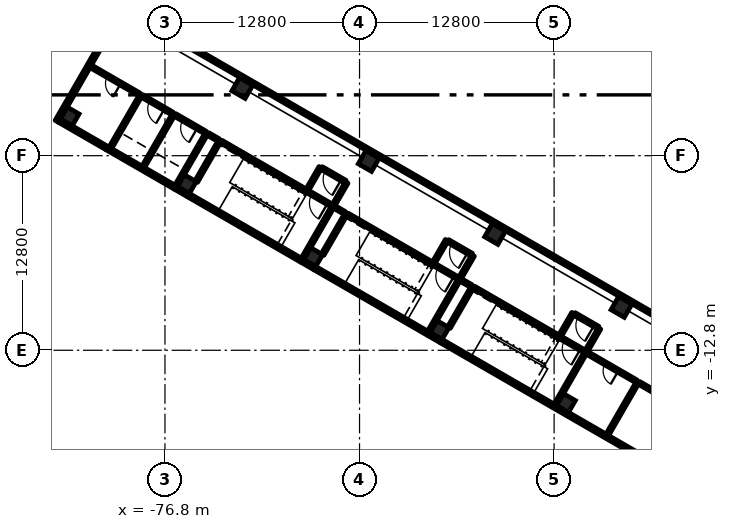
"""IFC4 building model, lengths in metres.
Left out: names, types, materials, properties, quantities, classifications, styles, units other than length and angle.
Written with IfcOpenShell. Run it as: python <this file> out.ifc"""

import sys

from ifc_helpers import new_model, si_unit, direction, frame, frame_2d, origin, origin_2d, place, context, subcontext, project, spatial, rectangle, extrude, element, fill, save


model = new_model("IFC4")
c1 = context("Model", 3, precision=1e-05, world=origin(), true_north=direction((0.0, 1.0)))
c2 = subcontext(c1, "Body", "Model", "MODEL_VIEW")
j1 = project(units=[si_unit("LENGTHUNIT", "METRE"), si_unit("PLANEANGLEUNIT", "RADIAN")], contexts=[c1])
p1 = place(None, origin())
s1 = spatial("IfcSite", under=j1, at=p1, CompositionType="ELEMENT")
p2 = place(p1, origin())
s2 = spatial("IfcBuilding", under=s1, at=p2, CompositionType="ELEMENT")
p3 = place(p2, frame((0.0, 0.0, 16.2)))
s3 = spatial("IfcBuildingStorey", under=s2, at=p3, CompositionType="ELEMENT", Elevation=16.2)
for number, where, z_axis, x_axis in (
    (1, (-46.768, -9.949, 0.0), (0.0, 0.0, 1.0), (-0.5, -0.866, 0.0)),
    (2, (-55.082, -5.149, 0.0), (0.0, 0.0, 1.0), (-0.5, -0.866, 0.0)),
    (3, (-63.396, -0.349, 0.0), (0.0, 0.0, 1.0), (-0.5, -0.866, 0.0)),
    (4, (-71.71, 4.451, 0.0), (0.0, 0.0, 1.0), (-0.5, -0.866, 0.0)),
):
    element("IfcColumn", number, at=place(p3, frame(where, z_axis=z_axis, x_axis=x_axis)), inside=s3, PredefinedType="COLUMN", context=c2, shape_type="SweptSolid", body=[
        extrude(rectangle(XDim=1.0, YDim=1.0, at=origin_2d()), origin(), (0.0, 0.0, 1.0), 5.4),
    ])
for number, where, z_axis, x_axis in (
    (5, (-50.418, -16.271, 0.0), (0.0, 0.0, 1.0), (-0.5, -0.866, 0.0)),
    (6, (-58.732, -11.471, 0.0), (0.0, 0.0, 1.0), (-0.5, -0.866, 0.0)),
    (7, (-67.046, -6.671, 0.0), (0.0, 0.0, 1.0), (-0.5, -0.866, 0.0)),
    (8, (-75.36, -1.871, 0.0), (0.0, 0.0, 1.0), (-0.5, -0.866, 0.0)),
    (9, (-83.067, 2.579, 0.0), (0.0, 0.0, 1.0), (-0.5, -0.866, 0.0)),
):
    element("IfcColumn", number, at=place(p3, frame(where, z_axis=z_axis, x_axis=x_axis)), inside=s3, PredefinedType="COLUMN", context=c2, shape_type="SweptSolid", body=[
        extrude(rectangle(XDim=0.9, YDim=0.9, at=origin_2d()), origin(), (0.0, 0.0, 1.0), 5.4),
    ])
p4 = place(p3, frame((-83.915, 2.26, 0.0), z_axis=(0.0, 0.0, 1.0), x_axis=(0.499999331568, 0.866025789703, 0.0)))
e10 = element("IfcWall", 10, at=p4, inside=s3, PredefinedType="SOLIDWALL", context=c2, shape_type="SweptSolid", body=[
    extrude(rectangle(XDim=8.625, YDim=0.25, at=frame_2d((4.312, 0.0))), origin(), (0.0, 0.0, 1.0), 5.0),
])
p5 = place(p3, frame((-42.608, -21.444, 0.0), z_axis=(0.0, 0.0, 1.0), x_axis=(-0.866025598446, 0.499999662836, 0.0)))
e11 = element("IfcWall", 11, at=p5, inside=s3, PredefinedType="SOLIDWALL", context=c2, shape_type="SweptSolid", body=[
    extrude(rectangle(XDim=18.5, YDim=0.25, at=frame_2d((9.25, 0.0))), origin(), (0.0, 0.0, 1.0), 5.0),
])
p6 = place(p3, frame((-59.496, -11.694, 0.0), z_axis=(0.0, 0.0, 1.0), x_axis=(-0.866021068297, 0.500007509209, 0.0)))
e12 = element("IfcWall", 12, at=p6, inside=s3, PredefinedType="SOLIDWALL", context=c2, shape_type="SweptSolid", body=[
    extrude(rectangle(XDim=8.6, YDim=0.25, at=frame_2d((4.3, 0.0))), origin(), (0.0, 0.0, 1.0), 5.0),
])
p7 = place(p3, frame((-67.81, -6.894, 0.0), z_axis=(0.0, 0.0, 1.0), x_axis=(-0.866028165386, 0.499995216735, 0.0)))
e13 = element("IfcWall", 13, at=p7, inside=s3, PredefinedType="SOLIDWALL", context=c2, shape_type="SweptSolid", body=[
    extrude(rectangle(XDim=8.6, YDim=0.25, at=frame_2d((4.3, 0.0))), origin(), (0.0, 0.0, 1.0), 5.0),
])
p8 = place(p3, frame((-76.124, -2.094, 0.0), z_axis=(0.0, 0.0, 1.0), x_axis=(-0.866029992723, 0.499992051641, 0.0)))
e14 = element("IfcWall", 14, at=p8, inside=s3, PredefinedType="SOLIDWALL", context=c2, shape_type="SweptSolid", body=[
    extrude(rectangle(XDim=5.2, YDim=0.25, at=frame_2d((2.6, 0.0))), origin(), (0.0, 0.0, 1.0), 5.0),
])
p9 = place(p3, frame((-80.627, 0.506, 0.0), z_axis=(0.0, 0.0, 1.0), x_axis=(-0.866018442252, 0.500012057535, 0.0)))
e15 = element("IfcWall", 15, at=p9, inside=s3, PredefinedType="SOLIDWALL", context=c2, shape_type="SweptSolid", body=[
    extrude(rectangle(XDim=3.6, YDim=0.25, at=frame_2d((1.8, 0.0))), origin(), (0.0, 0.0, 1.0), 5.0),
])
p10 = place(p9, frame((0.25, 0.0, 0.9)))
e16 = element("IfcOpeningElement", 16, at=p10, cuts=e15, PredefinedType="OPENING", context=c2, shape_type="SweptSolid", body=[
    extrude(rectangle(XDim=2.0, YDim=1.8, at=frame_2d((1.0, 0.9))), frame((0.0, 0.135, 0.0), z_axis=(0.0, -1.0, 0.0), x_axis=(1.0, 0.0, 0.0)), (0.0, 0.0, 1.0), 0.27),
])
for number, where, z_axis, x_axis in (
    (17, (-58.63, -12.194, 0.0), (0.0, 0.0, 1.0), (-0.866, 0.5, 0.0)),
    (18, (-66.944, -7.394, 0.0), (0.0, 0.0, 1.0), (-0.866, 0.5, 0.0)),
    (19, (-75.258, -2.594, 0.0), (0.0, 0.0, 1.0), (-0.866, 0.5, 0.0)),
):
    element("IfcWall", number, at=place(p3, frame(where, z_axis=z_axis, x_axis=x_axis)), inside=s3, PredefinedType="SOLIDWALL", context=c2, shape_type="SweptSolid", body=[
        extrude(rectangle(XDim=1.0, YDim=0.25, at=frame_2d((0.5, 0.0))), origin(), (0.0, 0.0, 1.0), 5.0),
    ])
p11 = place(p3, frame((-49.119, -12.921, 0.0), z_axis=(0.0, 0.0, 1.0), x_axis=(-0.49999894854, -0.866026010844, 0.0)))
e20 = element("IfcWall", 20, at=p11, inside=s3, PredefinedType="SOLIDWALL", context=c2, shape_type="SweptSolid", body=[
    extrude(rectangle(XDim=4.0, YDim=0.2, at=frame_2d((2.0, 0.0))), origin(), (0.0, 0.0, 1.0), 5.0),
])
p12 = place(p3, frame((-56.567, -8.621, 0.0), z_axis=(0.0, 0.0, 1.0), x_axis=(-0.499933790963, -0.866063626216, 0.0)))
e21 = element("IfcWall", 21, at=p12, inside=s3, PredefinedType="SOLIDWALL", context=c2, shape_type="SweptSolid", body=[
    extrude(rectangle(XDim=3.1, YDim=0.2, at=frame_2d((1.55, 0.0))), origin(), (0.0, 0.0, 1.0), 5.0),
])
p13 = place(p3, frame((-57.433, -8.121, 0.0), z_axis=(0.0, 0.0, 1.0), x_axis=(-0.49999894854, -0.866026010844, 0.0)))
e22 = element("IfcWall", 22, at=p13, inside=s3, PredefinedType="SOLIDWALL", context=c2, shape_type="SweptSolid", body=[
    extrude(rectangle(XDim=4.0, YDim=0.2, at=frame_2d((2.0, 0.0))), origin(), (0.0, 0.0, 1.0), 5.0),
])
p14 = place(p3, frame((-64.881, -3.821, 0.0), z_axis=(0.0, 0.0, 1.0), x_axis=(-0.49999285859, -0.86602952684, 0.0)))
e23 = element("IfcWall", 23, at=p14, inside=s3, PredefinedType="SOLIDWALL", context=c2, shape_type="SweptSolid", body=[
    extrude(rectangle(XDim=3.1, YDim=0.2, at=frame_2d((1.55, 0.0))), origin(), (0.0, 0.0, 1.0), 5.0),
])
p15 = place(p3, frame((-65.747, -3.321, 0.0), z_axis=(0.0, 0.0, 1.0), x_axis=(-0.49999894854, -0.866026010844, 0.0)))
e24 = element("IfcWall", 24, at=p15, inside=s3, PredefinedType="SOLIDWALL", context=c2, shape_type="SweptSolid", body=[
    extrude(rectangle(XDim=4.0, YDim=0.2, at=frame_2d((2.0, 0.0))), origin(), (0.0, 0.0, 1.0), 5.0),
])
p16 = place(p3, frame((-73.195, 0.979, 0.0), z_axis=(0.0, 0.0, 1.0), x_axis=(-0.500026960575, -0.86600983753, 0.0)))
e25 = element("IfcWall", 25, at=p16, inside=s3, PredefinedType="SOLIDWALL", context=c2, shape_type="SweptSolid", body=[
    extrude(rectangle(XDim=3.1, YDim=0.2, at=frame_2d((1.55, 0.0))), origin(), (0.0, 0.0, 1.0), 5.0),
])
p17 = place(p3, frame((-49.206, -12.871, 0.0), z_axis=(0.0, 0.0, 1.0), x_axis=(-0.866036909293, 0.499980071345, 0.0)))
e26 = element("IfcWall", 26, at=p17, inside=s3, PredefinedType="SOLIDWALL", context=c2, shape_type="SweptSolid", body=[
    extrude(rectangle(XDim=1.75, YDim=0.2, at=frame_2d((0.875, 0.0))), origin(), (0.0, 0.0, 1.0), 5.0),
])
p18 = place(p17, frame((0.3, 0.0, 0.0)))
e27 = element("IfcOpeningElement", 27, at=p18, cuts=e26, PredefinedType="OPENING", context=c2, shape_type="SweptSolid", body=[
    extrude(rectangle(XDim=1.2, YDim=2.1, at=frame_2d((0.6, 1.05))), frame((0.0, 0.11, 0.0), z_axis=(0.0, -1.0, 0.0), x_axis=(1.0, 0.0, 0.0)), (0.0, 0.0, 1.0), 0.22),
])
p19 = place(p3, frame((-50.722, -11.996, 0.0), z_axis=(0.0, 0.0, 1.0), x_axis=(-0.866027239912, 0.49999681972, 0.0)))
e28 = element("IfcWall", 28, at=p19, inside=s3, PredefinedType="SOLIDWALL", context=c2, shape_type="SweptSolid", body=[
    extrude(rectangle(XDim=6.65, YDim=0.2, at=frame_2d((3.325, 0.0))), origin(), (0.0, 0.0, 1.0), 5.0),
])
p20 = place(p3, frame((-57.52, -8.071, 0.0), z_axis=(0.0, 0.0, 1.0), x_axis=(-0.866002029911, 0.500040482552, 0.0)))
e29 = element("IfcWall", 29, at=p20, inside=s3, PredefinedType="SOLIDWALL", context=c2, shape_type="SweptSolid", body=[
    extrude(rectangle(XDim=1.75, YDim=0.2, at=frame_2d((0.875, 0.0))), origin(), (0.0, 0.0, 1.0), 5.0),
])
p21 = place(p20, frame((0.3, 0.0, 0.0)))
e30 = element("IfcOpeningElement", 30, at=p21, cuts=e29, PredefinedType="OPENING", context=c2, shape_type="SweptSolid", body=[
    extrude(rectangle(XDim=1.2, YDim=2.1, at=frame_2d((0.6, 1.05))), frame((0.0, 0.11, 0.0), z_axis=(0.0, -1.0, 0.0), x_axis=(1.0, 0.0, 0.0)), (0.0, 0.0, 1.0), 0.22),
])
p22 = place(p3, frame((-59.035, -7.196, 0.0), z_axis=(0.0, 0.0, 1.0), x_axis=(-0.866027239912, 0.49999681972, 0.0)))
e31 = element("IfcWall", 31, at=p22, inside=s3, PredefinedType="SOLIDWALL", context=c2, shape_type="SweptSolid", body=[
    extrude(rectangle(XDim=6.65, YDim=0.2, at=frame_2d((3.325, 0.0))), origin(), (0.0, 0.0, 1.0), 5.0),
])
p23 = place(p3, frame((-65.834, -3.271, 0.0), z_axis=(0.0, 0.0, 1.0), x_axis=(-0.866036909293, 0.499980071345, 0.0)))
e32 = element("IfcWall", 32, at=p23, inside=s3, PredefinedType="SOLIDWALL", context=c2, shape_type="SweptSolid", body=[
    extrude(rectangle(XDim=1.75, YDim=0.2, at=frame_2d((0.875, 0.0))), origin(), (0.0, 0.0, 1.0), 5.0),
])
p24 = place(p23, frame((0.3, 0.0, 0.0)))
e33 = element("IfcOpeningElement", 33, at=p24, cuts=e32, PredefinedType="OPENING", context=c2, shape_type="SweptSolid", body=[
    extrude(rectangle(XDim=1.2, YDim=2.1, at=frame_2d((0.6, 1.05))), frame((0.0, 0.11, 0.0), z_axis=(0.0, -1.0, 0.0), x_axis=(1.0, 0.0, 0.0)), (0.0, 0.0, 1.0), 0.22),
])
p25 = place(p3, frame((-67.349, -2.396, 0.0), z_axis=(0.0, 0.0, 1.0), x_axis=(-0.86601134256, 0.500024353964, 0.0)))
e34 = element("IfcWall", 34, at=p25, inside=s3, PredefinedType="SOLIDWALL", context=c2, shape_type="SweptSolid", body=[
    extrude(rectangle(XDim=6.65, YDim=0.2, at=frame_2d((3.325, 0.0))), origin(), (0.0, 0.0, 1.0), 5.0),
])
for number, where, z_axis, x_axis in (
    (35, (-74.061, 1.479, 0.0), (0.0, 0.0, 1.0), (-0.5, -0.866, 0.0)),
    (36, (-76.226, 2.729, 0.0), (0.0, 0.0, 1.0), (-0.5, -0.866, 0.0)),
    (37, (-78.391, 3.979, 0.0), (0.0, 0.0, 1.0), (-0.5, -0.866, 0.0)),
):
    element("IfcWall", number, at=place(p3, frame(where, z_axis=z_axis, x_axis=x_axis)), inside=s3, PredefinedType="SOLIDWALL", context=c2, shape_type="SweptSolid", body=[
        extrude(rectangle(XDim=4.0, YDim=0.2, at=frame_2d((2.0, 0.0))), origin(), (0.0, 0.0, 1.0), 5.0),
    ])
p26 = place(p3, frame((-74.148, 1.529, 0.0), z_axis=(0.0, 0.0, 1.0), x_axis=(-0.865980515519, 0.500077740698, 0.0)))
e38 = element("IfcWall", 38, at=p26, inside=s3, PredefinedType="SOLIDWALL", context=c2, shape_type="SweptSolid", body=[
    extrude(rectangle(XDim=2.3, YDim=0.2, at=frame_2d((1.15, 0.0))), origin(), (0.0, 0.0, 1.0), 5.0),
])
p27 = place(p26, frame((0.6, 0.0, 0.0)))
e39 = element("IfcOpeningElement", 39, at=p27, cuts=e38, PredefinedType="OPENING", context=c2, shape_type="SweptSolid", body=[
    extrude(rectangle(XDim=1.1, YDim=2.1, at=frame_2d((0.55, 1.05))), frame((0.0, 0.11, 0.0), z_axis=(0.0, -1.0, 0.0), x_axis=(1.0, 0.0, 0.0)), (0.0, 0.0, 1.0), 0.22),
])
p28 = place(p3, frame((-76.313, 2.779, 0.0), z_axis=(0.0, 0.0, 1.0), x_axis=(-0.865980515519, 0.500077740698, 0.0)))
e40 = element("IfcWall", 40, at=p28, inside=s3, PredefinedType="SOLIDWALL", context=c2, shape_type="SweptSolid", body=[
    extrude(rectangle(XDim=2.3, YDim=0.2, at=frame_2d((1.15, 0.0))), origin(), (0.0, 0.0, 1.0), 5.0),
])
p29 = place(p28, frame((0.6, 0.0, 0.0)))
e41 = element("IfcOpeningElement", 41, at=p29, cuts=e40, PredefinedType="OPENING", context=c2, shape_type="SweptSolid", body=[
    extrude(rectangle(XDim=1.1, YDim=2.1, at=frame_2d((0.55, 1.05))), frame((0.0, 0.11, 0.0), z_axis=(0.0, -1.0, 0.0), x_axis=(1.0, 0.0, 0.0)), (0.0, 0.0, 1.0), 0.22),
])
for number, where, z_axis, x_axis in (
    (42, (-48.219, -11.363, 0.0), (0.0, 0.0, 1.0), (-0.5, -0.866, 0.0)),
    (43, (-49.951, -10.363, 0.0), (0.0, 0.0, 1.0), (-0.5, -0.866, 0.0)),
):
    element("IfcWall", number, at=place(p3, frame(where, z_axis=z_axis, x_axis=x_axis)), inside=s3, PredefinedType="PARTITIONING", context=c2, shape_type="SweptSolid", body=[
        extrude(rectangle(XDim=1.7, YDim=0.2, at=frame_2d((0.85, 0.0))), origin(), (0.0, 0.0, 1.0), 4.1),
    ])
for number, where, z_axis, x_axis in (
    (44, (-56.533, -6.562, 0.0), (0.0, 0.0, 1.0), (-0.5, -0.866, 0.0)),
    (45, (-58.265, -5.562, 0.0), (0.0, 0.0, 1.0), (-0.5, -0.866, 0.0)),
):
    element("IfcWall", number, at=place(p3, frame(where, z_axis=z_axis, x_axis=x_axis)), inside=s3, PredefinedType="PARTITIONING", context=c2, shape_type="SweptSolid", body=[
        extrude(rectangle(XDim=1.7, YDim=0.2, at=frame_2d((0.85, 0.0))), origin(), (0.0, 0.0, 1.0), 4.1),
    ])
for number, where, z_axis, x_axis in (
    (46, (-64.847, -1.763, 0.0), (0.0, 0.0, 1.0), (-0.5, -0.866, 0.0)),
    (47, (-66.579, -0.763, 0.0), (0.0, 0.0, 1.0), (-0.5, -0.866, 0.0)),
):
    element("IfcWall", number, at=place(p3, frame(where, z_axis=z_axis, x_axis=x_axis)), inside=s3, PredefinedType="PARTITIONING", context=c2, shape_type="SweptSolid", body=[
        extrude(rectangle(XDim=1.7, YDim=0.2, at=frame_2d((0.85, 0.0))), origin(), (0.0, 0.0, 1.0), 4.1),
    ])
p30 = place(p3, frame((-48.306, -11.312, 0.0), z_axis=(0.0, 0.0, 1.0), x_axis=(-0.866047807691, 0.499961193289, 0.0)))
e48 = element("IfcWall", 48, at=p30, inside=s3, PredefinedType="PARTITIONING", context=c2, shape_type="SweptSolid", body=[
    extrude(rectangle(XDim=1.8, YDim=0.2, at=frame_2d((0.9, 0.0))), origin(), (0.0, 0.0, 1.0), 4.1),
])
p31 = place(p30, frame((0.3, 0.0, 0.0)))
e49 = element("IfcOpeningElement", 49, at=p31, cuts=e48, PredefinedType="OPENING", context=c2, shape_type="SweptSolid", body=[
    extrude(rectangle(XDim=1.2, YDim=2.1, at=frame_2d((0.6, 1.05))), frame((0.0, 0.11, 0.0), z_axis=(0.0, -1.0, 0.0), x_axis=(1.0, 0.0, 0.0)), (0.0, 0.0, 1.0), 0.22),
])
p32 = place(p3, frame((-56.62, -6.513, 0.0), z_axis=(0.0, 0.0, 1.0), x_axis=(-0.865989075817, 0.500062916607, 0.0)))
e50 = element("IfcWall", 50, at=p32, inside=s3, PredefinedType="PARTITIONING", context=c2, shape_type="SweptSolid", body=[
    extrude(rectangle(XDim=1.8, YDim=0.2, at=frame_2d((0.9, 0.0))), origin(), (0.0, 0.0, 1.0), 4.1),
])
p33 = place(p32, frame((0.3, 0.0, 0.0)))
e51 = element("IfcOpeningElement", 51, at=p33, cuts=e50, PredefinedType="OPENING", context=c2, shape_type="SweptSolid", body=[
    extrude(rectangle(XDim=1.2, YDim=2.1, at=frame_2d((0.6, 1.05))), frame((0.0, 0.11, 0.0), z_axis=(0.0, -1.0, 0.0), x_axis=(1.0, 0.0, 0.0)), (0.0, 0.0, 1.0), 0.22),
])
p34 = place(p3, frame((-64.934, -1.713, 0.0), z_axis=(0.0, 0.0, 1.0), x_axis=(-0.866022985545, 0.500004188491, 0.0)))
e52 = element("IfcWall", 52, at=p34, inside=s3, PredefinedType="PARTITIONING", context=c2, shape_type="SweptSolid", body=[
    extrude(rectangle(XDim=1.8, YDim=0.2, at=frame_2d((0.9, 0.0))), origin(), (0.0, 0.0, 1.0), 4.1),
])
p35 = place(p34, frame((0.3, 0.0, 0.0)))
e53 = element("IfcOpeningElement", 53, at=p35, cuts=e52, PredefinedType="OPENING", context=c2, shape_type="SweptSolid", body=[
    extrude(rectangle(XDim=1.2, YDim=2.1, at=frame_2d((0.6, 1.05))), frame((0.0, 0.11, 0.0), z_axis=(0.0, -1.0, 0.0), x_axis=(1.0, 0.0, 0.0)), (0.0, 0.0, 1.0), 0.22),
])
p36 = place(p3, frame((-45.699, -14.896, 0.0), z_axis=(0.0, 0.0, 1.0), x_axis=(-0.49999894854, -0.866026010844, 0.0)))
e54 = element("IfcWall", 54, at=p36, inside=s3, PredefinedType="PARTITIONING", context=c2, shape_type="SweptSolid", body=[
    extrude(rectangle(XDim=4.0, YDim=0.2, at=frame_2d((2.0, 0.0))), origin(), (0.0, 0.0, 1.0), 4.1),
])
p37 = place(p3, frame((-42.667, -16.646, 0.0), z_axis=(0.0, 0.0, 1.0), x_axis=(-0.866007419912, 0.500031147688, 0.0)))
e55 = element("IfcWall", 55, at=p37, inside=s3, PredefinedType="PARTITIONING", context=c2, shape_type="SweptSolid", body=[
    extrude(rectangle(XDim=3.4, YDim=0.2, at=frame_2d((1.7, 0.0))), origin(), (0.0, 0.0, 1.0), 4.1),
])
p38 = place(p37, frame((1.2, 0.0, 0.0)))
e56 = element("IfcOpeningElement", 56, at=p38, cuts=e55, PredefinedType="OPENING", context=c2, shape_type="SweptSolid", body=[
    extrude(rectangle(XDim=1.0, YDim=2.1, at=frame_2d((0.5, 1.05))), frame((0.0, 0.11, 0.0), z_axis=(0.0, -1.0, 0.0), x_axis=(1.0, 0.0, 0.0)), (0.0, 0.0, 1.0), 0.22),
])
p39 = place(p3, frame((-45.785, -14.846, 0.0), z_axis=(0.0, 0.0, 1.0), x_axis=(-0.866022959057, 0.500004234368, 0.0)))
e57 = element("IfcWall", 57, at=p39, inside=s3, PredefinedType="PARTITIONING", context=c2, shape_type="SweptSolid", body=[
    extrude(rectangle(XDim=3.75, YDim=0.2, at=frame_2d((1.875, 0.0))), origin(), (0.0, 0.0, 1.0), 4.1),
])
p40 = place(p39, frame((1.375, 0.0, 0.0)))
e58 = element("IfcOpeningElement", 58, at=p40, cuts=e57, PredefinedType="OPENING", context=c2, shape_type="SweptSolid", body=[
    extrude(rectangle(XDim=1.0, YDim=2.1, at=frame_2d((0.5, 1.05))), frame((0.0, 0.11, 0.0), z_axis=(0.0, -1.0, 0.0), x_axis=(1.0, 0.0, 0.0)), (0.0, 0.0, 1.0), 0.22),
])
p41 = place(p3, frame((-78.478, 4.029, 0.0), z_axis=(0.0, 0.0, 1.0), x_axis=(-0.866000971088, 0.500042316284, 0.0)))
e59 = element("IfcWall", 59, at=p41, inside=s3, PredefinedType="PARTITIONING", context=c2, shape_type="SweptSolid", body=[
    extrude(rectangle(XDim=3.7, YDim=0.2, at=frame_2d((1.85, 0.0))), origin(), (0.0, 0.0, 1.0), 4.1),
])
p42 = place(p41, frame((1.425, 0.0, 0.0)))
e60 = element("IfcOpeningElement", 60, at=p42, cuts=e59, PredefinedType="OPENING", context=c2, shape_type="SweptSolid", body=[
    extrude(rectangle(XDim=1.0, YDim=2.1, at=frame_2d((0.5, 1.05))), frame((0.0, 0.11, 0.0), z_axis=(0.0, -1.0, 0.0), x_axis=(1.0, 0.0, 0.0)), (0.0, 0.0, 1.0), 0.22),
])
p43 = place(p3, frame((-38.358, -14.083, 0.0), z_axis=(0.0, 0.0, 1.0), x_axis=(-0.866024244032, 0.500002008745, 0.0)))
e61 = element("IfcWall", 61, at=p43, inside=s3, PredefinedType="PARTITIONING", context=c2, shape_type="SweptSolid", body=[
    extrude(rectangle(XDim=47.5, YDim=0.2, at=frame_2d((23.75, 0.0))), origin(), (0.0, 0.0, 1.0), 4.1),
])
p44 = place(p3, frame((-56.654, -8.571, 0.0), z_axis=(0.0, 0.0, 1.0), x_axis=(-0.866094119867, 0.499880961361, 0.0)))
e62 = element("IfcWall", 62, at=p44, inside=s3, PredefinedType="PARTITIONING", context=c2, shape_type="SweptSolid", body=[
    extrude(rectangle(XDim=0.8, YDim=0.2, at=frame_2d((0.4, 0.0))), origin(), (0.0, 0.0, 1.0), 4.1),
])
p45 = place(p3, frame((-64.968, -3.771, 0.0), z_axis=(0.0, 0.0, 1.0), x_axis=(-0.865885638426, 0.500242002602, 0.0)))
e63 = element("IfcWall", 63, at=p45, inside=s3, PredefinedType="PARTITIONING", context=c2, shape_type="SweptSolid", body=[
    extrude(rectangle(XDim=0.8, YDim=0.2, at=frame_2d((0.4, 0.0))), origin(), (0.0, 0.0, 1.0), 4.1),
])
p46 = place(p3, frame((-73.281, 1.029, 0.0), z_axis=(0.0, 0.0, 1.0), x_axis=(-0.865961984968, 0.500109828528, 0.0)))
e64 = element("IfcWall", 64, at=p46, inside=s3, PredefinedType="PARTITIONING", context=c2, shape_type="SweptSolid", body=[
    extrude(rectangle(XDim=0.8, YDim=0.2, at=frame_2d((0.4, 0.0))), origin(), (0.0, 0.0, 1.0), 4.1),
])
p47 = place(p10, origin())
e65 = element("IfcWindow", 65, at=p47, inside=s3, PartitioningType="SINGLE_PANEL", PredefinedType="WINDOW", context=c2, shape_type="SweptSolid", body=[
    extrude(rectangle(XDim=2.0, YDim=1.8, at=frame_2d((1.0, 0.9))), frame((0.0, 0.03, 0.0), z_axis=(0.0, -1.0, 0.0), x_axis=(1.0, 0.0, 0.0)), (0.0, 0.0, 1.0), 0.06),
])
fill(e16, e65)
p48 = place(p18, origin())
e66 = element("IfcDoor", 66, at=p48, inside=s3, OperationType="SINGLE_SWING_LEFT", PredefinedType="DOOR", context=c2, shape_type="SweptSolid", body=[
    extrude(rectangle(XDim=1.2, YDim=2.1, at=frame_2d((0.6, 1.05))), frame((0.0, 0.025, 0.0), z_axis=(0.0, -1.0, 0.0), x_axis=(1.0, 0.0, 0.0)), (0.0, 0.0, 1.0), 0.05),
])
fill(e27, e66)
p49 = place(p21, origin())
e67 = element("IfcDoor", 67, at=p49, inside=s3, OperationType="SINGLE_SWING_LEFT", PredefinedType="DOOR", context=c2, shape_type="SweptSolid", body=[
    extrude(rectangle(XDim=1.2, YDim=2.1, at=frame_2d((0.6, 1.05))), frame((0.0, 0.025, 0.0), z_axis=(0.0, -1.0, 0.0), x_axis=(1.0, 0.0, 0.0)), (0.0, 0.0, 1.0), 0.05),
])
fill(e30, e67)
p50 = place(p24, origin())
e68 = element("IfcDoor", 68, at=p50, inside=s3, OperationType="SINGLE_SWING_LEFT", PredefinedType="DOOR", context=c2, shape_type="SweptSolid", body=[
    extrude(rectangle(XDim=1.2, YDim=2.1, at=frame_2d((0.6, 1.05))), frame((0.0, 0.025, 0.0), z_axis=(0.0, -1.0, 0.0), x_axis=(1.0, 0.0, 0.0)), (0.0, 0.0, 1.0), 0.05),
])
fill(e33, e68)
p51 = place(p27, origin())
e69 = element("IfcDoor", 69, at=p51, inside=s3, OperationType="DOUBLE_DOOR_SLIDING", PredefinedType="DOOR", context=c2, shape_type="SweptSolid", body=[
    extrude(rectangle(XDim=1.1, YDim=2.1, at=frame_2d((0.55, 1.05))), frame((0.0, 0.025, 0.0), z_axis=(0.0, -1.0, 0.0), x_axis=(1.0, 0.0, 0.0)), (0.0, 0.0, 1.0), 0.05),
])
fill(e39, e69)
p52 = place(p29, origin())
e70 = element("IfcDoor", 70, at=p52, inside=s3, OperationType="DOUBLE_DOOR_SLIDING", PredefinedType="DOOR", context=c2, shape_type="SweptSolid", body=[
    extrude(rectangle(XDim=1.1, YDim=2.1, at=frame_2d((0.55, 1.05))), frame((0.0, 0.025, 0.0), z_axis=(0.0, -1.0, 0.0), x_axis=(1.0, 0.0, 0.0)), (0.0, 0.0, 1.0), 0.05),
])
fill(e41, e70)
p53 = place(p31, origin())
e71 = element("IfcDoor", 71, at=p53, inside=s3, OperationType="SINGLE_SWING_LEFT", PredefinedType="DOOR", context=c2, shape_type="SweptSolid", body=[
    extrude(rectangle(XDim=1.2, YDim=2.1, at=frame_2d((0.6, 1.05))), frame((0.0, 0.025, 0.0), z_axis=(0.0, -1.0, 0.0), x_axis=(1.0, 0.0, 0.0)), (0.0, 0.0, 1.0), 0.05),
])
fill(e49, e71)
p54 = place(p33, origin())
e72 = element("IfcDoor", 72, at=p54, inside=s3, OperationType="SINGLE_SWING_LEFT", PredefinedType="DOOR", context=c2, shape_type="SweptSolid", body=[
    extrude(rectangle(XDim=1.2, YDim=2.1, at=frame_2d((0.6, 1.05))), frame((0.0, 0.025, 0.0), z_axis=(0.0, -1.0, 0.0), x_axis=(1.0, 0.0, 0.0)), (0.0, 0.0, 1.0), 0.05),
])
fill(e51, e72)
p55 = place(p35, origin())
e73 = element("IfcDoor", 73, at=p55, inside=s3, OperationType="SINGLE_SWING_LEFT", PredefinedType="DOOR", context=c2, shape_type="SweptSolid", body=[
    extrude(rectangle(XDim=1.2, YDim=2.1, at=frame_2d((0.6, 1.05))), frame((0.0, 0.025, 0.0), z_axis=(0.0, -1.0, 0.0), x_axis=(1.0, 0.0, 0.0)), (0.0, 0.0, 1.0), 0.05),
])
fill(e53, e73)
p56 = place(p40, origin())
e74 = element("IfcDoor", 74, at=p56, inside=s3, OperationType="SINGLE_SWING_LEFT", PredefinedType="DOOR", context=c2, shape_type="SweptSolid", body=[
    extrude(rectangle(XDim=1.0, YDim=2.1, at=frame_2d((0.5, 1.05))), frame((0.0, 0.025, 0.0), z_axis=(0.0, -1.0, 0.0), x_axis=(1.0, 0.0, 0.0)), (0.0, 0.0, 1.0), 0.05),
])
fill(e58, e74)
p57 = place(p42, origin())
e75 = element("IfcDoor", 75, at=p57, inside=s3, OperationType="SINGLE_SWING_LEFT", PredefinedType="DOOR", context=c2, shape_type="SweptSolid", body=[
    extrude(rectangle(XDim=1.0, YDim=2.1, at=frame_2d((0.5, 1.05))), frame((0.0, 0.025, 0.0), z_axis=(0.0, -1.0, 0.0), x_axis=(1.0, 0.0, 0.0)), (0.0, 0.0, 1.0), 0.05),
])
fill(e60, e75)
save(model, sys.argv[1])
